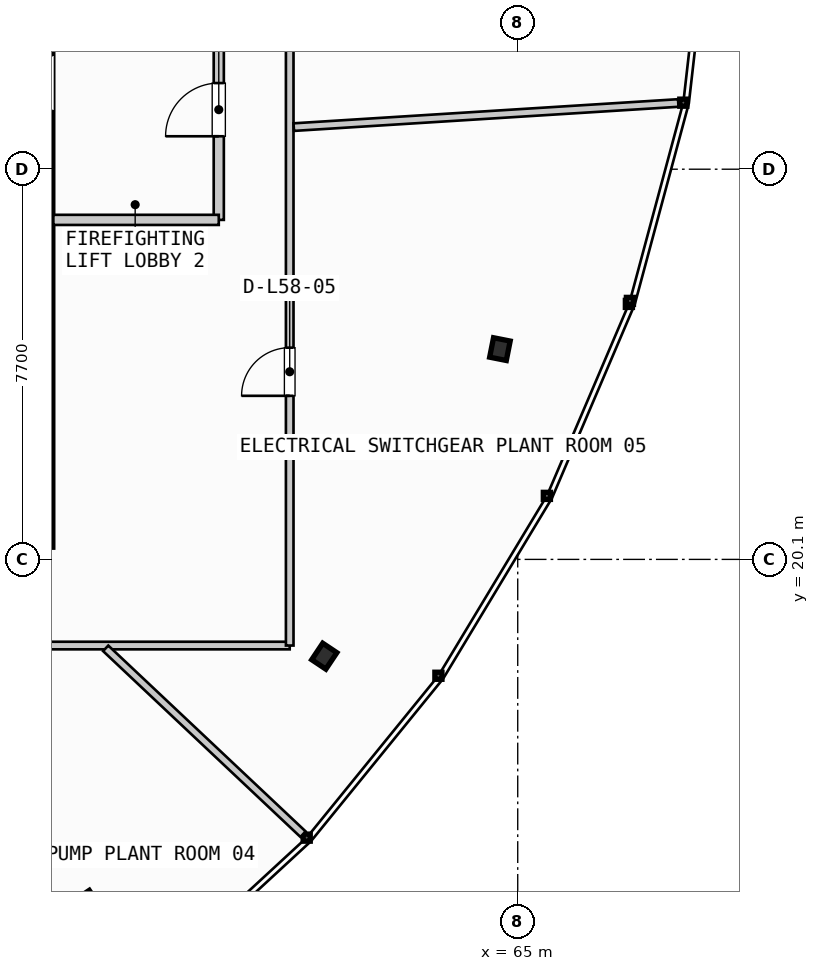
"""IFC4 building model, lengths in metres.
Left out: names, types, materials, properties, quantities, classifications, styles, units other than length and angle.
Written with IfcOpenShell. Run it as: python <this file> out.ifc"""

import sys

from ifc_helpers import new_model, si_unit, direction, frame, frame_2d, origin, origin_2d, place, context, subcontext, project, spatial, rectangle, i_section, extrude, source, transform, mapped, element, fill, save


model = new_model("IFC4")
c1 = context("Model", 3, precision=1e-05, world=origin(), true_north=direction((0.0, 1.0)))
c2 = subcontext(c1, "Body", "Model", "MODEL_VIEW")
j1 = project(units=[si_unit("LENGTHUNIT", "METRE"), si_unit("PLANEANGLEUNIT", "RADIAN")], contexts=[c1])
p1 = place(None, origin())
s1 = spatial("IfcSite", under=j1, at=p1, CompositionType="ELEMENT")
p2 = place(p1, origin())
s2 = spatial("IfcBuilding", under=s1, at=p2, CompositionType="ELEMENT")
p3 = place(p2, frame((0.0, 0.0, 223.6)))
s3 = spatial("IfcBuildingStorey", under=s2, at=p3, CompositionType="ELEMENT", Elevation=223.6)
p4 = place(p3, frame((55.6, 20.34, 0.0), z_axis=(0.0, 0.0, 1.0), x_axis=(0.0, 1.0, 0.0)))
e1 = element("IfcWall", 1, at=p4, inside=s3, PredefinedType="SHEAR", context=c2, shape_type="SweptSolid", body=[
    extrude(rectangle(XDim=14.92, YDim=0.45, at=frame_2d((7.46, 0.0))), origin(), (0.0, 0.0, 1.0), 4.38),
])
p5 = place(p4, frame((12.71, 0.0, 0.0)))
e2 = element("IfcOpeningElement", 2, at=p5, cuts=e1, PredefinedType="OPENING", context=c2, shape_type="SweptSolid", body=[
    extrude(rectangle(XDim=1.05, YDim=2.15, at=frame_2d((0.525, 1.075))), frame((0.0, 0.235, 0.0), z_axis=(0.0, -1.0, 0.0), x_axis=(1.0, 0.0, 0.0)), (0.0, 0.0, 1.0), 0.47),
])
p6 = place(p4, frame((8.61, 0.0, 0.0)))
e3 = element("IfcOpeningElement", 3, at=p6, cuts=e1, PredefinedType="OPENING", context=c2, shape_type="SweptSolid", body=[
    extrude(rectangle(XDim=1.1, YDim=2.2, at=frame_2d((0.55, 1.1))), frame((0.0, 0.235, 0.0), z_axis=(0.0, -1.0, 0.0), x_axis=(1.0, 0.0, 0.0)), (0.0, 0.0, 1.0), 0.47),
])
m1 = source(origin(), c2, "Body", "SweptSolid", [
    extrude(i_section(OverallWidth=0.391, OverallDepth=0.335, WebThickness=0.023, FlangeThickness=0.034, FilletRadius=0.015, at=origin_2d()), origin(), (0.0, 0.0, 1.0), 4.38),
])
for number, where, z_axis, x_axis in (
    (4, (56.475, 13.321, 0.0), (0.0, 0.0, 1.0), (0.556, -0.831, 0.0)),
    (5, (61.183, 18.19, 0.0), (0.0, 0.0, 1.0), (0.831, -0.556, 0.0)),
    (6, (64.649, 24.25, 0.0), (0.0, 0.0, 1.0), (0.981, -0.195, 0.0)),
):
    element("IfcColumn", number, at=place(p3, frame(where, z_axis=z_axis, x_axis=x_axis)), inside=s3, PredefinedType="COLUMN", context=c2, shape_type="MappedRepresentation", body=[
        mapped(m1, transform((0.0, 0.0, 0.0), scale=1.0)),
    ])
p7 = place(p3, frame((59.1, 26.8, 0.0), z_axis=(0.0, 0.0, 1.0), x_axis=(0.0, 1.0, 0.0)))
e7 = element("IfcWall", 7, at=p7, inside=s3, PredefinedType="PARTITIONING", context=c2, shape_type="SweptSolid", body=[
    extrude(rectangle(XDim=4.4, YDim=0.2, at=frame_2d((2.2, 0.0))), origin(), (0.0, 0.0, 1.0), 2.455),
])
p8 = place(p7, frame((1.65, 0.0, 0.0)))
e8 = element("IfcOpeningElement", 8, at=p8, cuts=e7, PredefinedType="OPENING", context=c2, shape_type="SweptSolid", body=[
    extrude(rectangle(XDim=1.05, YDim=2.15, at=frame_2d((0.525, 1.075))), frame((0.0, 0.11, 0.0), z_axis=(0.0, -1.0, 0.0), x_axis=(1.0, 0.0, 0.0)), (0.0, 0.0, 1.0), 0.22),
])
p9 = place(p3, frame((55.835, 26.8, 0.0), z_axis=(0.0, 0.0, 1.0), x_axis=(1.0, 0.0, 0.0)))
e9 = element("IfcWall", 9, at=p9, inside=s3, PredefinedType="PARTITIONING", context=c2, shape_type="SweptSolid", body=[
    extrude(rectangle(XDim=3.265, YDim=0.2, at=frame_2d((1.633, 0.0))), origin(), (0.0, 0.0, 1.0), 2.455),
])
p10 = place(p3, frame((33.1, 18.4, 0.0), z_axis=(0.0, 0.0, 1.0), x_axis=(1.0, 0.0, 0.0)))
e10 = element("IfcWall", 10, at=p10, inside=s3, PredefinedType="PARTITIONING", context=c2, shape_type="SweptSolid", body=[
    extrude(rectangle(XDim=27.4, YDim=0.15, at=frame_2d((13.7, 0.0))), origin(), (0.0, 0.0, 1.0), 2.455),
])
p11 = place(p10, frame((4.895, 0.0, 0.0)))
e11 = element("IfcOpeningElement", 11, at=p11, cuts=e10, PredefinedType="OPENING", context=c2, shape_type="SweptSolid", body=[
    extrude(rectangle(XDim=0.95, YDim=2.15, at=frame_2d((0.475, 1.075))), frame((0.0, 0.085, 0.0), z_axis=(0.0, -1.0, 0.0), x_axis=(1.0, 0.0, 0.0)), (0.0, 0.0, 1.0), 0.17),
])
p12 = place(p10, frame((12.85, 0.0, 0.0)))
e12 = element("IfcOpeningElement", 12, at=p12, cuts=e10, PredefinedType="OPENING", context=c2, shape_type="SweptSolid", body=[
    extrude(rectangle(XDim=0.95, YDim=2.15, at=frame_2d((0.475, 1.075))), frame((0.0, 0.085, 0.0), z_axis=(0.0, -1.0, 0.0), x_axis=(1.0, 0.0, 0.0)), (0.0, 0.0, 1.0), 0.17),
])
p13 = place(p10, frame((20.276, 0.0, 0.0)))
e13 = element("IfcOpeningElement", 13, at=p13, cuts=e10, PredefinedType="OPENING", context=c2, shape_type="SweptSolid", body=[
    extrude(rectangle(XDim=0.95, YDim=2.15, at=frame_2d((0.475, 1.075))), frame((0.0, 0.085, 0.0), z_axis=(0.0, -1.0, 0.0), x_axis=(1.0, 0.0, 0.0)), (0.0, 0.0, 1.0), 0.17),
])
p14 = place(p3, frame((60.5, 18.4, 0.0), z_axis=(0.0, 0.0, 1.0), x_axis=(0.0, 1.0, 0.0)))
e14 = element("IfcWall", 14, at=p14, inside=s3, PredefinedType="PARTITIONING", context=c2, shape_type="SweptSolid", body=[
    extrude(rectangle(XDim=18.8, YDim=0.15, at=frame_2d((9.4, 0.0))), origin(), (0.0, 0.0, 1.0), 2.455),
])
p15 = place(p14, frame((4.928, 0.0, 0.0)))
e15 = element("IfcOpeningElement", 15, at=p15, cuts=e14, PredefinedType="OPENING", context=c2, shape_type="SweptSolid", body=[
    extrude(rectangle(XDim=0.95, YDim=2.15, at=frame_2d((0.475, 1.075))), frame((0.0, 0.085, 0.0), z_axis=(0.0, -1.0, 0.0), x_axis=(1.0, 0.0, 0.0)), (0.0, 0.0, 1.0), 0.17),
])
p16 = place(p14, frame((13.494, 0.0, 0.0)))
e16 = element("IfcOpeningElement", 16, at=p16, cuts=e14, PredefinedType="OPENING", context=c2, shape_type="SweptSolid", body=[
    extrude(rectangle(XDim=0.95, YDim=2.15, at=frame_2d((0.475, 1.075))), frame((0.0, 0.085, 0.0), z_axis=(0.0, -1.0, 0.0), x_axis=(1.0, 0.0, 0.0)), (0.0, 0.0, 1.0), 0.17),
])
p17 = place(p3, frame((56.868, 18.345, 0.0), z_axis=(0.0, 0.0, 1.0), x_axis=(0.727986933266, -0.685591004166, 0.0)))
e17 = element("IfcWall", 17, at=p17, inside=s3, PredefinedType="PARTITIONING", context=c2, shape_type="SweptSolid", body=[
    extrude(rectangle(XDim=5.35, YDim=0.15, at=frame_2d((2.675, 0.0))), origin(), (0.0, 0.0, 1.0), 2.455),
])
p18 = place(p3, frame((60.58, 28.631, 0.0), z_axis=(0.0, 0.0, 1.0), x_axis=(0.998037933453, 0.062612166465, 0.0)))
e18 = element("IfcWall", 18, at=p18, inside=s3, PredefinedType="PARTITIONING", context=c2, shape_type="SweptSolid", body=[
    extrude(rectangle(XDim=7.604, YDim=0.15, at=frame_2d((3.802, 0.0))), origin(), (0.0, 0.0, 1.0), 2.455),
])
m2 = source(origin(), c2, "Body", "SweptSolid", [
    extrude(rectangle(XDim=1.05, YDim=2.15, at=frame_2d((0.525, 1.075))), frame((0.0, 0.025, 0.0), z_axis=(0.0, -1.0, 0.0), x_axis=(1.0, 0.0, 0.0)), (0.0, 0.0, 1.0), 0.05),
])
p19 = place(p8, origin())
e19 = element("IfcDoor", 19, at=p19, inside=s3, OperationType="SINGLE_SWING_LEFT", PredefinedType="DOOR", context=c2, shape_type="MappedRepresentation", body=[
    mapped(m2, transform((0.0, 0.0, 0.0), scale=1.0)),
])
fill(e8, e19)
m3 = source(origin(), c2, "Body", "SweptSolid", [
    extrude(rectangle(XDim=0.95, YDim=2.15, at=frame_2d((0.475, 1.075))), frame((0.0, 0.025, 0.0), z_axis=(0.0, -1.0, 0.0), x_axis=(1.0, 0.0, 0.0)), (0.0, 0.0, 1.0), 0.05),
])
p20 = place(p15, origin())
e20 = element("IfcDoor", 20, at=p20, inside=s3, OperationType="SINGLE_SWING_LEFT", PredefinedType="DOOR", context=c2, shape_type="MappedRepresentation", body=[
    mapped(m3, transform((0.0, 0.0, 0.0), scale=1.0)),
])
fill(e15, e20)
save(model, sys.argv[1])
